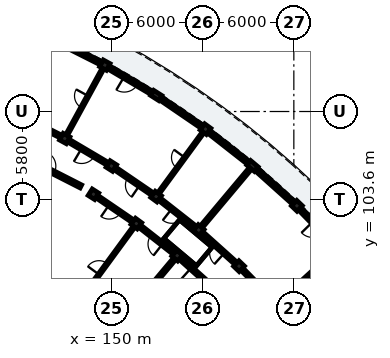
"""IFC4 building model, lengths in metres.
Left out: names, types, materials, properties, quantities, classifications, styles, units other than length and angle.
Written with IfcOpenShell. Run it as: python <this file> out.ifc"""

import sys

from ifc_helpers import new_model, si_unit, direction, frame, frame_2d, origin, origin_2d, place, context, subcontext, project, spatial, rectangle, extrude, element, fill, save


model = new_model("IFC4")
c1 = context("Model", 3, precision=1e-05, world=origin(), true_north=direction((0.0, 1.0)))
c2 = subcontext(c1, "Body", "Model", "MODEL_VIEW")
j1 = project(units=[si_unit("LENGTHUNIT", "METRE"), si_unit("PLANEANGLEUNIT", "RADIAN")], contexts=[c1])
p1 = place(None, origin())
s1 = spatial("IfcSite", under=j1, at=p1, CompositionType="ELEMENT")
p2 = place(p1, origin())
s2 = spatial("IfcBuilding", under=s1, at=p2, CompositionType="ELEMENT")
p3 = place(p2, frame((0.0, 0.0, 29.0)))
s3 = spatial("IfcBuildingStorey", under=s2, at=p3, CompositionType="ELEMENT", Elevation=29.0)
for number, where, z_axis, x_axis in (
    (1, (158.395, 99.226, 0.0), (0.0, 0.0, 1.0), (0.692, 0.722, 0.0)),
    (2, (162.2, 103.197, 0.0), (0.0, 0.0, 1.0), (0.692, 0.722, 0.0)),
    (3, (154.329, 99.919, 0.0), (0.0, 0.0, 1.0), (0.643, 0.766, 0.0)),
    (4, (155.743, 101.605, 0.0), (0.0, 0.0, 1.0), (0.643, 0.766, 0.0)),
):
    element("IfcColumn", number, at=place(p3, frame(where, z_axis=z_axis, x_axis=x_axis)), inside=s3, PredefinedType="COLUMN", context=c2, shape_type="SweptSolid", body=[
        extrude(rectangle(XDim=0.5, YDim=0.5, at=origin_2d()), origin(), (0.0, 0.0, 1.0), 3.115),
    ])
p4 = place(p3, frame((159.278, 105.818, 0.0), z_axis=(0.0, 0.0, 1.0), x_axis=(0.642787582947, 0.766044465556, 0.0)))
e5 = element("IfcColumn", 5, at=p4, inside=s3, PredefinedType="PILASTER", context=c2, shape_type="SweptSolid", body=[
    extrude(rectangle(XDim=0.39, YDim=0.63, at=origin_2d()), origin(), (0.0, 0.0, 1.0), 3.115),
])
for number, where, z_axis, x_axis in (
    (6, (151.639, 102.029, 0.0), (0.0, 0.0, 1.0), (0.591, 0.807, 0.0)),
    (7, (152.939, 103.804, 0.0), (0.0, 0.0, 1.0), (0.591, 0.807, 0.0)),
    (8, (156.189, 108.241, 0.0), (0.0, 0.0, 1.0), (0.591, 0.807, 0.0)),
    (9, (148.817, 103.957, 0.0), (0.0, 0.0, 1.0), (0.536, 0.844, 0.0)),
    (10, (149.997, 105.813, 0.0), (0.0, 0.0, 1.0), (0.536, 0.844, 0.0)),
):
    element("IfcColumn", number, at=place(p3, frame(where, z_axis=z_axis, x_axis=x_axis)), inside=s3, PredefinedType="COLUMN", context=c2, shape_type="SweptSolid", body=[
        extrude(rectangle(XDim=0.5, YDim=0.5, at=origin_2d()), origin(), (0.0, 0.0, 1.0), 3.115),
    ])
p5 = place(p3, frame((152.948, 110.455, 0.0), z_axis=(0.0, 0.0, 1.0), x_axis=(0.536481544469, 0.843912052553, 0.0)))
e11 = element("IfcColumn", 11, at=p5, inside=s3, PredefinedType="PILASTER", context=c2, shape_type="SweptSolid", body=[
    extrude(rectangle(XDim=0.39, YDim=0.63, at=origin_2d()), origin(), (0.0, 0.0, 1.0), 3.115),
])
for number, where, z_axis, x_axis in (
    (12, (146.928, 107.625, 0.0), (0.0, 0.0, 1.0), (0.48, 0.877, 0.0)),
    (13, (149.567, 112.451, 0.0), (0.0, 0.0, 1.0), (0.48, 0.877, 0.0)),
):
    element("IfcColumn", number, at=place(p3, frame(where, z_axis=z_axis, x_axis=x_axis)), inside=s3, PredefinedType="COLUMN", context=c2, shape_type="SweptSolid", body=[
        extrude(rectangle(XDim=0.5, YDim=0.5, at=origin_2d()), origin(), (0.0, 0.0, 1.0), 3.115),
    ])
p6 = place(p3, frame((164.829, 100.507, 0.0), z_axis=(0.0, 0.0, 1.0), x_axis=(-0.698819119584, 0.715298425906, 0.0)))
e14 = element("IfcWall", 14, at=p6, inside=s3, PredefinedType="SOLIDWALL", context=c2, shape_type="SweptSolid", body=[
    extrude(rectangle(XDim=3.541, YDim=0.24, at=frame_2d((1.771, 0.0))), origin(), (0.0, 0.0, 1.0), 2.355),
])
p7 = place(p6, frame((1.26, 0.0, 0.0)))
e15 = element("IfcOpeningElement", 15, at=p7, cuts=e14, PredefinedType="OPENING", context=c2, shape_type="SweptSolid", body=[
    extrude(rectangle(XDim=1.02, YDim=2.14, at=frame_2d((0.51, 1.07))), frame((0.0, 0.13, 0.0), z_axis=(0.0, -1.0, 0.0), x_axis=(1.0, 0.0, 0.0)), (0.0, 0.0, 1.0), 0.26),
])
p8 = place(p3, frame((162.037, 103.344, 0.0), z_axis=(0.0, 0.0, 1.0), x_axis=(-0.744438243575, 0.667691322021, 0.0)))
e16 = element("IfcWall", 16, at=p8, inside=s3, PredefinedType="SOLIDWALL", context=c2, shape_type="SweptSolid", body=[
    extrude(rectangle(XDim=3.541, YDim=0.24, at=frame_2d((1.77, 0.0))), origin(), (0.0, 0.0, 1.0), 2.355),
])
p9 = place(p8, frame((1.17, 0.0, 0.55)))
e17 = element("IfcOpeningElement", 17, at=p9, cuts=e16, PredefinedType="OPENING", context=c2, shape_type="SweptSolid", body=[
    extrude(rectangle(XDim=1.2, YDim=1.55, at=frame_2d((0.6, 0.775))), frame((0.0, 0.13, 0.0), z_axis=(0.0, -1.0, 0.0), x_axis=(1.0, 0.0, 0.0)), (0.0, 0.0, 1.0), 0.26),
])
p10 = place(p3, frame((159.148, 105.92, 0.0), z_axis=(0.0, 0.0, 1.0), x_axis=(-0.786813367299, 0.617190995592, 0.0)))
e18 = element("IfcWall", 18, at=p10, inside=s3, PredefinedType="SOLIDWALL", context=c2, shape_type="SweptSolid", body=[
    extrude(rectangle(XDim=3.541, YDim=0.24, at=frame_2d((1.771, 0.0))), origin(), (0.0, 0.0, 1.0), 2.355),
])
p11 = place(p10, frame((1.095, 0.0, 0.35)))
e19 = element("IfcOpeningElement", 19, at=p11, cuts=e18, PredefinedType="OPENING", context=c2, shape_type="SweptSolid", body=[
    extrude(rectangle(XDim=1.35, YDim=1.65, at=frame_2d((0.675, 0.825))), frame((0.0, 0.13, 0.0), z_axis=(0.0, -1.0, 0.0), x_axis=(1.0, 0.0, 0.0)), (0.0, 0.0, 1.0), 0.26),
])
p12 = place(p3, frame((156.008, 108.365, 0.0), z_axis=(0.0, 0.0, 1.0), x_axis=(-0.825792366032, 0.563974262005, 0.0)))
e20 = element("IfcWall", 20, at=p12, inside=s3, PredefinedType="SOLIDWALL", context=c2, shape_type="SweptSolid", body=[
    extrude(rectangle(XDim=3.541, YDim=0.24, at=frame_2d((1.77, 0.0))), origin(), (0.0, 0.0, 1.0), 2.355),
])
p13 = place(p12, frame((1.02, 0.0, 0.35)))
e21 = element("IfcOpeningElement", 21, at=p13, cuts=e20, PredefinedType="OPENING", context=c2, shape_type="SweptSolid", body=[
    extrude(rectangle(XDim=1.5, YDim=1.7, at=frame_2d((0.75, 0.85))), frame((0.0, 0.13, 0.0), z_axis=(0.0, -1.0, 0.0), x_axis=(1.0, 0.0, 0.0)), (0.0, 0.0, 1.0), 0.26),
])
p14 = place(p3, frame((152.805, 110.539, 0.0), z_axis=(0.0, 0.0, 1.0), x_axis=(-0.861133733249, 0.508378494294, 0.0)))
e22 = element("IfcWall", 22, at=p14, inside=s3, PredefinedType="SOLIDWALL", context=c2, shape_type="SweptSolid", body=[
    extrude(rectangle(XDim=3.541, YDim=0.24, at=frame_2d((1.771, 0.0))), origin(), (0.0, 0.0, 1.0), 2.355),
])
p15 = place(p14, frame((1.26, 0.0, 0.0)))
e23 = element("IfcOpeningElement", 23, at=p15, cuts=e22, PredefinedType="OPENING", context=c2, shape_type="SweptSolid", body=[
    extrude(rectangle(XDim=1.02, YDim=2.14, at=frame_2d((0.51, 1.07))), frame((0.0, 0.13, 0.0), z_axis=(0.0, -1.0, 0.0), x_axis=(1.0, 0.0, 0.0)), (0.0, 0.0, 1.0), 0.26),
])
p16 = place(p3, frame((149.371, 112.55, 0.0), z_axis=(0.0, 0.0, 1.0), x_axis=(-0.892766264705, 0.450520140066, 0.0)))
e24 = element("IfcWall", 24, at=p16, inside=s3, PredefinedType="SOLIDWALL", context=c2, shape_type="SweptSolid", body=[
    extrude(rectangle(XDim=3.541, YDim=0.24, at=frame_2d((1.771, 0.0))), origin(), (0.0, 0.0, 1.0), 2.355),
])
p17 = place(p16, frame((0.87, 0.0, 0.35)))
e25 = element("IfcOpeningElement", 25, at=p17, cuts=e24, PredefinedType="OPENING", context=c2, shape_type="SweptSolid", body=[
    extrude(rectangle(XDim=1.8, YDim=1.85, at=frame_2d((0.9, 0.925))), frame((0.0, 0.13, 0.0), z_axis=(0.0, -1.0, 0.0), x_axis=(1.0, 0.0, 0.0)), (0.0, 0.0, 1.0), 0.26),
])
p18 = place(p3, frame((143.625, 106.696, 0.0), z_axis=(0.0, 0.0, 1.0), x_axis=(0.891003372311, -0.453996685595, 0.0)))
e26 = element("IfcWall", 26, at=p18, inside=s3, PredefinedType="PARTITIONING", context=c2, shape_type="SweptSolid", body=[
    extrude(rectangle(XDim=4.9, YDim=0.22, at=frame_2d((2.45, 0.0))), origin(), (0.0, 0.0, 1.0), 2.34),
])
p19 = place(p18, frame((1.95, 0.0, 0.0)))
e27 = element("IfcOpeningElement", 27, at=p19, cuts=e26, PredefinedType="OPENING", context=c2, shape_type="SweptSolid", body=[
    extrude(rectangle(XDim=0.98, YDim=2.14, at=frame_2d((0.49, 1.07))), frame((0.0, 0.12, 0.0), z_axis=(0.0, -1.0, 0.0), x_axis=(1.0, 0.0, 0.0)), (0.0, 0.0, 1.0), 0.24),
])
p20 = place(p3, frame((161.18, 96.947, 0.0), z_axis=(0.0, 0.0, 1.0), x_axis=(0.737934199263, 0.674872667663, 0.0)))
e28 = element("IfcWall", 28, at=p20, inside=s3, PredefinedType="PARTITIONING", context=c2, shape_type="SweptSolid", body=[
    extrude(rectangle(XDim=4.7, YDim=0.185, at=frame_2d((2.35, 0.0))), origin(), (0.0, 0.0, 1.0), 2.37),
])
p21 = place(p3, frame((160.641, 96.927, 0.0), z_axis=(0.0, 0.0, 1.0), x_axis=(-0.698787219683, 0.715329589496, 0.0)))
e29 = element("IfcWall", 29, at=p21, inside=s3, PredefinedType="PARTITIONING", context=c2, shape_type="SweptSolid", body=[
    extrude(rectangle(XDim=2.863, YDim=0.205, at=frame_2d((1.432, 0.0))), origin(), (0.0, 0.0, 1.0), 2.37),
])
p22 = place(p21, frame((0.937, 0.0, 0.0)))
e30 = element("IfcOpeningElement", 30, at=p22, cuts=e29, PredefinedType="OPENING", context=c2, shape_type="SweptSolid", body=[
    extrude(rectangle(XDim=0.99, YDim=2.16, at=frame_2d((0.495, 1.08))), frame((0.0, 0.113, 0.0), z_axis=(0.0, -1.0, 0.0), x_axis=(1.0, 0.0, 0.0)), (0.0, 0.0, 1.0), 0.225),
])
p23 = place(p3, frame((158.135, 99.459, 0.0), z_axis=(0.0, 0.0, 1.0), x_axis=(-0.744433521088, 0.667696587291, 0.0)))
e31 = element("IfcWall", 31, at=p23, inside=s3, PredefinedType="PARTITIONING", context=c2, shape_type="SweptSolid", body=[
    extrude(rectangle(XDim=2.863, YDim=0.205, at=frame_2d((1.432, 0.0))), origin(), (0.0, 0.0, 1.0), 2.37),
])
p24 = place(p23, frame((0.947, 0.0, 0.0)))
e32 = element("IfcOpeningElement", 32, at=p24, cuts=e31, PredefinedType="OPENING", context=c2, shape_type="SweptSolid", body=[
    extrude(rectangle(XDim=0.97, YDim=2.15, at=frame_2d((0.485, 1.075))), frame((0.0, 0.113, 0.0), z_axis=(0.0, -1.0, 0.0), x_axis=(1.0, 0.0, 0.0)), (0.0, 0.0, 1.0), 0.225),
])
p25 = place(p3, frame((156.613, 97.871, 0.0), z_axis=(0.0, 0.0, 1.0), x_axis=(-0.744418559135, 0.667713268413, 0.0)))
e33 = element("IfcWall", 33, at=p25, inside=s3, PredefinedType="PARTITIONING", context=c2, shape_type="SweptSolid", body=[
    extrude(rectangle(XDim=2.718, YDim=0.205, at=frame_2d((1.359, 0.0))), origin(), (0.0, 0.0, 1.0), 2.37),
])
p26 = place(p25, frame((0.874, 0.0, 0.0)))
e34 = element("IfcOpeningElement", 34, at=p26, cuts=e33, PredefinedType="OPENING", context=c2, shape_type="SweptSolid", body=[
    extrude(rectangle(XDim=0.97, YDim=2.15, at=frame_2d((0.485, 1.075))), frame((0.0, 0.113, 0.0), z_axis=(0.0, -1.0, 0.0), x_axis=(1.0, 0.0, 0.0)), (0.0, 0.0, 1.0), 0.225),
])
p27 = place(p3, frame((156.0, 101.911, 0.0), z_axis=(0.0, 0.0, 1.0), x_axis=(0.642811926223, 0.766024038465, 0.0)))
e35 = element("IfcWall", 35, at=p27, inside=s3, PredefinedType="PARTITIONING", context=c2, shape_type="SweptSolid", body=[
    extrude(rectangle(XDim=4.7, YDim=0.185, at=frame_2d((2.35, 0.0))), origin(), (0.0, 0.0, 1.0), 2.37),
])
p28 = place(p3, frame((149.829, 94.557, 0.0), z_axis=(0.0, 0.0, 1.0), x_axis=(0.642789470807, 0.766042881449, 0.0)))
e36 = element("IfcWall", 36, at=p28, inside=s3, PredefinedType="PARTITIONING", context=c2, shape_type="SweptSolid", body=[
    extrude(rectangle(XDim=6.6, YDim=0.185, at=frame_2d((3.3, 0.0))), origin(), (0.0, 0.0, 1.0), 2.37),
])
p29 = place(p3, frame((155.467, 101.821, 0.0), z_axis=(0.0, 0.0, 1.0), x_axis=(-0.786806323554, 0.617199975061, 0.0)))
e37 = element("IfcWall", 37, at=p29, inside=s3, PredefinedType="PARTITIONING", context=c2, shape_type="SweptSolid", body=[
    extrude(rectangle(XDim=2.863, YDim=0.205, at=frame_2d((1.432, 0.0))), origin(), (0.0, 0.0, 1.0), 2.37),
])
p30 = place(p29, frame((0.957, 0.0, 0.0)))
e38 = element("IfcOpeningElement", 38, at=p30, cuts=e37, PredefinedType="OPENING", context=c2, shape_type="SweptSolid", body=[
    extrude(rectangle(XDim=0.95, YDim=2.13, at=frame_2d((0.475, 1.065))), frame((0.0, 0.113, 0.0), z_axis=(0.0, -1.0, 0.0), x_axis=(1.0, 0.0, 0.0)), (0.0, 0.0, 1.0), 0.225),
])
p31 = place(p3, frame((154.053, 100.135, 0.0), z_axis=(0.0, 0.0, 1.0), x_axis=(-0.786835457019, 0.617162833924, 0.0)))
e39 = element("IfcWall", 39, at=p31, inside=s3, PredefinedType="PARTITIONING", context=c2, shape_type="SweptSolid", body=[
    extrude(rectangle(XDim=2.718, YDim=0.205, at=frame_2d((1.359, 0.0))), origin(), (0.0, 0.0, 1.0), 2.37),
])
p32 = place(p31, frame((0.884, 0.0, 0.0)))
e40 = element("IfcOpeningElement", 40, at=p32, cuts=e39, PredefinedType="OPENING", context=c2, shape_type="SweptSolid", body=[
    extrude(rectangle(XDim=0.95, YDim=2.13, at=frame_2d((0.475, 1.065))), frame((0.0, 0.113, 0.0), z_axis=(0.0, -1.0, 0.0), x_axis=(1.0, 0.0, 0.0)), (0.0, 0.0, 1.0), 0.225),
])
p33 = place(p3, frame((153.176, 104.126, 0.0), z_axis=(0.0, 0.0, 1.0), x_axis=(0.590910940129, 0.806736797745, 0.0)))
e41 = element("IfcWall", 41, at=p33, inside=s3, PredefinedType="PARTITIONING", context=c2, shape_type="SweptSolid", body=[
    extrude(rectangle(XDim=4.7, YDim=0.125, at=frame_2d((2.35, 0.0))), origin(), (0.0, 0.0, 1.0), 2.37),
])
p34 = place(p33, frame((1.915, 0.0, 0.0)))
e42 = element("IfcOpeningElement", 42, at=p34, cuts=e41, PredefinedType="OPENING", context=c2, shape_type="SweptSolid", body=[
    extrude(rectangle(XDim=0.87, YDim=2.08, at=frame_2d((0.435, 1.04))), frame((0.0, 0.073, 0.0), z_axis=(0.0, -1.0, 0.0), x_axis=(1.0, 0.0, 0.0)), (0.0, 0.0, 1.0), 0.145),
])
p35 = place(p3, frame((147.503, 96.382, 0.0), z_axis=(0.0, 0.0, 1.0), x_axis=(0.590924179316, 0.806727100263, 0.0)))
e43 = element("IfcWall", 43, at=p35, inside=s3, PredefinedType="PARTITIONING", context=c2, shape_type="SweptSolid", body=[
    extrude(rectangle(XDim=6.6, YDim=0.125, at=frame_2d((3.3, 0.0))), origin(), (0.0, 0.0, 1.0), 2.37),
])
p36 = place(p35, frame((2.845, 0.0, 0.0)))
e44 = element("IfcOpeningElement", 44, at=p36, cuts=e43, PredefinedType="OPENING", context=c2, shape_type="SweptSolid", body=[
    extrude(rectangle(XDim=0.91, YDim=2.1, at=frame_2d((0.455, 1.05))), frame((0.0, 0.073, 0.0), z_axis=(0.0, -1.0, 0.0), x_axis=(1.0, 0.0, 0.0)), (0.0, 0.0, 1.0), 0.145),
])
p37 = place(p3, frame((152.65, 104.001, 0.0), z_axis=(0.0, 0.0, 1.0), x_axis=(-0.825779671787, 0.563992848947, 0.0)))
e45 = element("IfcWall", 45, at=p37, inside=s3, PredefinedType="PARTITIONING", context=c2, shape_type="SweptSolid", body=[
    extrude(rectangle(XDim=2.863, YDim=0.205, at=frame_2d((1.432, 0.0))), origin(), (0.0, 0.0, 1.0), 2.37),
])
p38 = place(p37, frame((0.967, 0.0, 0.0)))
e46 = element("IfcOpeningElement", 46, at=p38, cuts=e45, PredefinedType="OPENING", context=c2, shape_type="SweptSolid", body=[
    extrude(rectangle(XDim=0.93, YDim=2.12, at=frame_2d((0.465, 1.06))), frame((0.0, 0.113, 0.0), z_axis=(0.0, -1.0, 0.0), x_axis=(1.0, 0.0, 0.0)), (0.0, 0.0, 1.0), 0.225),
])
p39 = place(p3, frame((151.35, 102.226, 0.0), z_axis=(0.0, 0.0, 1.0), x_axis=(-0.825752009056, 0.56403334967, 0.0)))
e47 = element("IfcWall", 47, at=p39, inside=s3, PredefinedType="PARTITIONING", context=c2, shape_type="SweptSolid", body=[
    extrude(rectangle(XDim=2.718, YDim=0.205, at=frame_2d((1.359, 0.0))), origin(), (0.0, 0.0, 1.0), 2.37),
])
p40 = place(p39, frame((0.894, 0.0, 0.0)))
e48 = element("IfcOpeningElement", 48, at=p40, cuts=e47, PredefinedType="OPENING", context=c2, shape_type="SweptSolid", body=[
    extrude(rectangle(XDim=0.93, YDim=2.12, at=frame_2d((0.465, 1.06))), frame((0.0, 0.113, 0.0), z_axis=(0.0, -1.0, 0.0), x_axis=(1.0, 0.0, 0.0)), (0.0, 0.0, 1.0), 0.225),
])
p41 = place(p3, frame((149.695, 105.991, 0.0), z_axis=(0.0, 0.0, 1.0), x_axis=(-0.861113214678, 0.508413248753, 0.0)))
e49 = element("IfcWall", 49, at=p41, inside=s3, PredefinedType="PARTITIONING", context=c2, shape_type="SweptSolid", body=[
    extrude(rectangle(XDim=2.863, YDim=0.205, at=frame_2d((1.432, 0.0))), origin(), (0.0, 0.0, 1.0), 2.37),
])
p42 = place(p41, frame((0.937, 0.0, 0.0)))
e50 = element("IfcOpeningElement", 50, at=p42, cuts=e49, PredefinedType="OPENING", context=c2, shape_type="SweptSolid", body=[
    extrude(rectangle(XDim=0.99, YDim=2.16, at=frame_2d((0.495, 1.08))), frame((0.0, 0.113, 0.0), z_axis=(0.0, -1.0, 0.0), x_axis=(1.0, 0.0, 0.0)), (0.0, 0.0, 1.0), 0.225),
])
p43 = place(p3, frame((147.12, 107.976, 0.0), z_axis=(0.0, 0.0, 1.0), x_axis=(0.479721743761, 0.877420679357, 0.0)))
e51 = element("IfcWall", 51, at=p43, inside=s3, PredefinedType="PARTITIONING", context=c2, shape_type="SweptSolid", body=[
    extrude(rectangle(XDim=4.7, YDim=0.125, at=frame_2d((2.35, 0.0))), origin(), (0.0, 0.0, 1.0), 2.37),
])
p44 = place(p43, frame((1.905, 0.0, 0.0)))
e52 = element("IfcOpeningElement", 52, at=p44, cuts=e51, PredefinedType="OPENING", context=c2, shape_type="SweptSolid", body=[
    extrude(rectangle(XDim=0.89, YDim=2.1, at=frame_2d((0.445, 1.05))), frame((0.0, 0.073, 0.0), z_axis=(0.0, -1.0, 0.0), x_axis=(1.0, 0.0, 0.0)), (0.0, 0.0, 1.0), 0.145),
])
p45 = place(p3, frame((146.616, 107.782, 0.0), z_axis=(0.0, 0.0, 1.0), x_axis=(-0.89273239336, 0.450587254419, 0.0)))
e53 = element("IfcWall", 53, at=p45, inside=s3, PredefinedType="PARTITIONING", context=c2, shape_type="SweptSolid", body=[
    extrude(rectangle(XDim=2.863, YDim=0.205, at=frame_2d((1.432, 0.0))), origin(), (0.0, 0.0, 1.0), 2.37),
])
p46 = place(p45, frame((0.947, 0.0, 0.0)))
e54 = element("IfcOpeningElement", 54, at=p46, cuts=e53, PredefinedType="OPENING", context=c2, shape_type="SweptSolid", body=[
    extrude(rectangle(XDim=0.97, YDim=2.15, at=frame_2d((0.485, 1.075))), frame((0.0, 0.113, 0.0), z_axis=(0.0, -1.0, 0.0), x_axis=(1.0, 0.0, 0.0)), (0.0, 0.0, 1.0), 0.225),
])
p47 = place(p9, origin())
e55 = element("IfcWindow", 55, at=p47, inside=s3, PartitioningType="SINGLE_PANEL", PredefinedType="WINDOW", context=c2, shape_type="SweptSolid", body=[
    extrude(rectangle(XDim=1.2, YDim=1.55, at=frame_2d((0.6, 0.775))), frame((0.0, 0.03, 0.0), z_axis=(0.0, -1.0, 0.0), x_axis=(1.0, 0.0, 0.0)), (0.0, 0.0, 1.0), 0.06),
])
fill(e17, e55)
p48 = place(p11, origin())
e56 = element("IfcWindow", 56, at=p48, inside=s3, PartitioningType="SINGLE_PANEL", PredefinedType="WINDOW", context=c2, shape_type="SweptSolid", body=[
    extrude(rectangle(XDim=1.35, YDim=1.65, at=frame_2d((0.675, 0.825))), frame((0.0, 0.03, 0.0), z_axis=(0.0, -1.0, 0.0), x_axis=(1.0, 0.0, 0.0)), (0.0, 0.0, 1.0), 0.06),
])
fill(e19, e56)
p49 = place(p13, origin())
e57 = element("IfcWindow", 57, at=p49, inside=s3, PartitioningType="SINGLE_PANEL", PredefinedType="WINDOW", context=c2, shape_type="SweptSolid", body=[
    extrude(rectangle(XDim=1.5, YDim=1.7, at=frame_2d((0.75, 0.85))), frame((0.0, 0.03, 0.0), z_axis=(0.0, -1.0, 0.0), x_axis=(1.0, 0.0, 0.0)), (0.0, 0.0, 1.0), 0.06),
])
fill(e21, e57)
p50 = place(p15, origin())
e58 = element("IfcDoor", 58, at=p50, inside=s3, OperationType="SINGLE_SWING_RIGHT", PredefinedType="DOOR", context=c2, shape_type="SweptSolid", body=[
    extrude(rectangle(XDim=1.02, YDim=2.14, at=frame_2d((0.51, 1.07))), frame((0.0, 0.025, 0.0), z_axis=(0.0, -1.0, 0.0), x_axis=(1.0, 0.0, 0.0)), (0.0, 0.0, 1.0), 0.05),
])
fill(e23, e58)
p51 = place(p17, origin())
e59 = element("IfcWindow", 59, at=p51, inside=s3, PartitioningType="SINGLE_PANEL", PredefinedType="WINDOW", context=c2, shape_type="SweptSolid", body=[
    extrude(rectangle(XDim=1.8, YDim=1.85, at=frame_2d((0.9, 0.925))), frame((0.0, 0.03, 0.0), z_axis=(0.0, -1.0, 0.0), x_axis=(1.0, 0.0, 0.0)), (0.0, 0.0, 1.0), 0.06),
])
fill(e25, e59)
p52 = place(p19, origin())
e60 = element("IfcDoor", 60, at=p52, inside=s3, OperationType="SINGLE_SWING_LEFT", PredefinedType="DOOR", context=c2, shape_type="SweptSolid", body=[
    extrude(rectangle(XDim=0.98, YDim=2.14, at=frame_2d((0.49, 1.07))), frame((0.0, 0.025, 0.0), z_axis=(0.0, -1.0, 0.0), x_axis=(1.0, 0.0, 0.0)), (0.0, 0.0, 1.0), 0.05),
])
fill(e27, e60)
p53 = place(p24, origin())
e61 = element("IfcDoor", 61, at=p53, inside=s3, OperationType="SINGLE_SWING_LEFT", PredefinedType="DOOR", context=c2, shape_type="SweptSolid", body=[
    extrude(rectangle(XDim=0.97, YDim=2.15, at=frame_2d((0.485, 1.075))), frame((0.0, 0.025, 0.0), z_axis=(0.0, -1.0, 0.0), x_axis=(1.0, 0.0, 0.0)), (0.0, 0.0, 1.0), 0.05),
])
fill(e32, e61)
p54 = place(p26, origin())
e62 = element("IfcDoor", 62, at=p54, inside=s3, OperationType="SINGLE_SWING_RIGHT", PredefinedType="DOOR", context=c2, shape_type="SweptSolid", body=[
    extrude(rectangle(XDim=0.97, YDim=2.15, at=frame_2d((0.485, 1.075))), frame((0.0, 0.025, 0.0), z_axis=(0.0, -1.0, 0.0), x_axis=(1.0, 0.0, 0.0)), (0.0, 0.0, 1.0), 0.05),
])
fill(e34, e62)
p55 = place(p30, origin())
e63 = element("IfcDoor", 63, at=p55, inside=s3, OperationType="SINGLE_SWING_RIGHT", PredefinedType="DOOR", context=c2, shape_type="SweptSolid", body=[
    extrude(rectangle(XDim=0.95, YDim=2.13, at=frame_2d((0.475, 1.065))), frame((0.0, 0.025, 0.0), z_axis=(0.0, -1.0, 0.0), x_axis=(1.0, 0.0, 0.0)), (0.0, 0.0, 1.0), 0.05),
])
fill(e38, e63)
p56 = place(p32, origin())
e64 = element("IfcDoor", 64, at=p56, inside=s3, OperationType="SINGLE_SWING_LEFT", PredefinedType="DOOR", context=c2, shape_type="SweptSolid", body=[
    extrude(rectangle(XDim=0.95, YDim=2.13, at=frame_2d((0.475, 1.065))), frame((0.0, 0.025, 0.0), z_axis=(0.0, -1.0, 0.0), x_axis=(1.0, 0.0, 0.0)), (0.0, 0.0, 1.0), 0.05),
])
fill(e40, e64)
p57 = place(p34, origin())
e65 = element("IfcDoor", 65, at=p57, inside=s3, OperationType="SINGLE_SWING_RIGHT", PredefinedType="DOOR", context=c2, shape_type="SweptSolid", body=[
    extrude(rectangle(XDim=0.87, YDim=2.08, at=frame_2d((0.435, 1.04))), frame((0.0, 0.025, 0.0), z_axis=(0.0, -1.0, 0.0), x_axis=(1.0, 0.0, 0.0)), (0.0, 0.0, 1.0), 0.05),
])
fill(e42, e65)
p58 = place(p36, origin())
e66 = element("IfcDoor", 66, at=p58, inside=s3, OperationType="SINGLE_SWING_LEFT", PredefinedType="DOOR", context=c2, shape_type="SweptSolid", body=[
    extrude(rectangle(XDim=0.91, YDim=2.1, at=frame_2d((0.455, 1.05))), frame((0.0, 0.025, 0.0), z_axis=(0.0, -1.0, 0.0), x_axis=(1.0, 0.0, 0.0)), (0.0, 0.0, 1.0), 0.05),
])
fill(e44, e66)
p59 = place(p38, origin())
e67 = element("IfcDoor", 67, at=p59, inside=s3, OperationType="SINGLE_SWING_LEFT", PredefinedType="DOOR", context=c2, shape_type="SweptSolid", body=[
    extrude(rectangle(XDim=0.93, YDim=2.12, at=frame_2d((0.465, 1.06))), frame((0.0, 0.025, 0.0), z_axis=(0.0, -1.0, 0.0), x_axis=(1.0, 0.0, 0.0)), (0.0, 0.0, 1.0), 0.05),
])
fill(e46, e67)
p60 = place(p40, origin())
e68 = element("IfcDoor", 68, at=p60, inside=s3, OperationType="SINGLE_SWING_RIGHT", PredefinedType="DOOR", context=c2, shape_type="SweptSolid", body=[
    extrude(rectangle(XDim=0.93, YDim=2.12, at=frame_2d((0.465, 1.06))), frame((0.0, 0.025, 0.0), z_axis=(0.0, -1.0, 0.0), x_axis=(1.0, 0.0, 0.0)), (0.0, 0.0, 1.0), 0.05),
])
fill(e48, e68)
p61 = place(p42, origin())
e69 = element("IfcDoor", 69, at=p61, inside=s3, OperationType="SINGLE_SWING_RIGHT", PredefinedType="DOOR", context=c2, shape_type="SweptSolid", body=[
    extrude(rectangle(XDim=0.99, YDim=2.16, at=frame_2d((0.495, 1.08))), frame((0.0, 0.025, 0.0), z_axis=(0.0, -1.0, 0.0), x_axis=(1.0, 0.0, 0.0)), (0.0, 0.0, 1.0), 0.05),
])
fill(e50, e69)
p62 = place(p44, origin())
e70 = element("IfcDoor", 70, at=p62, inside=s3, OperationType="SINGLE_SWING_RIGHT", PredefinedType="DOOR", context=c2, shape_type="SweptSolid", body=[
    extrude(rectangle(XDim=0.89, YDim=2.1, at=frame_2d((0.445, 1.05))), frame((0.0, 0.025, 0.0), z_axis=(0.0, -1.0, 0.0), x_axis=(1.0, 0.0, 0.0)), (0.0, 0.0, 1.0), 0.05),
])
fill(e52, e70)
save(model, sys.argv[1])
